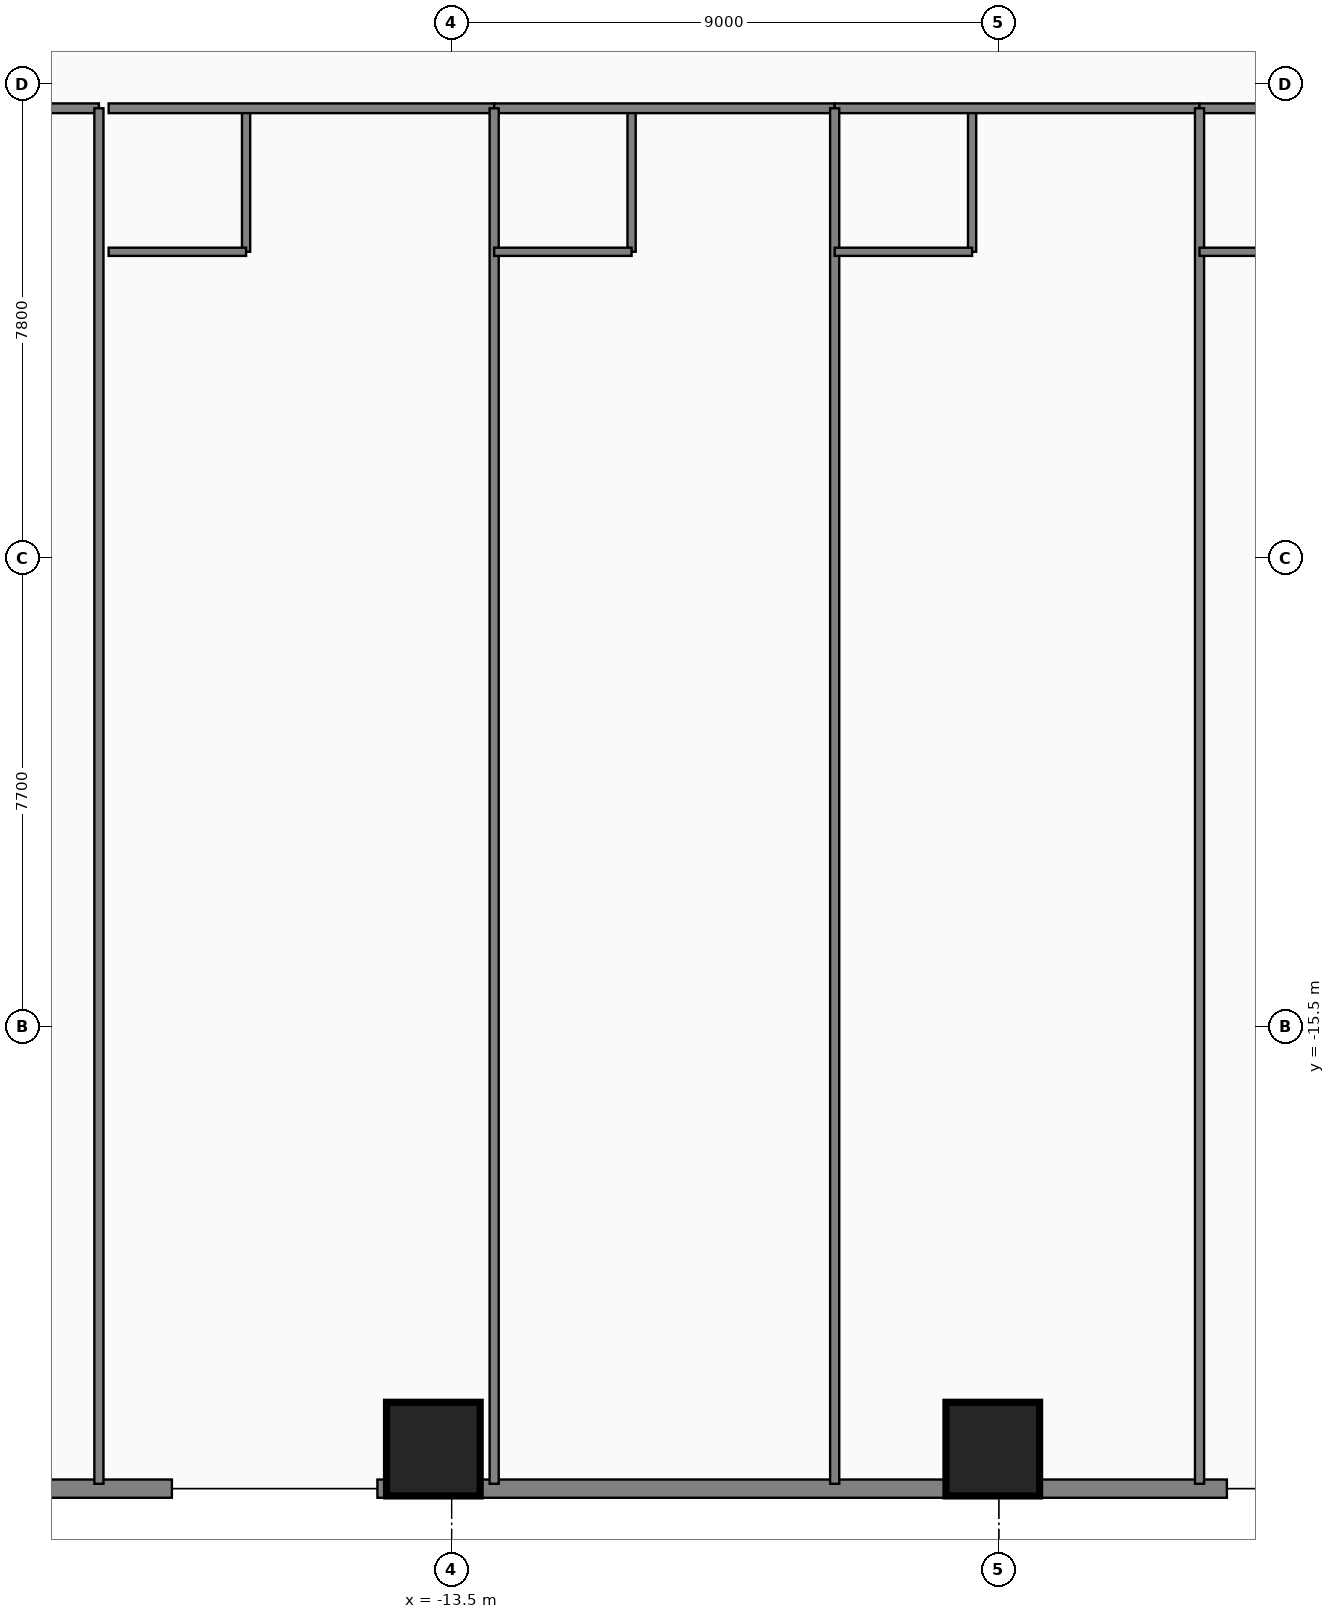
"""IFC4 building model, lengths in metres.
Left out: names, types, materials, properties, quantities, classifications, styles, units other than length and angle.
Written with IfcOpenShell. Run it as: python <this file> out.ifc"""

import sys

from ifc_helpers import new_model, si_unit, direction, frame, frame_2d, origin, origin_2d, place, context, subcontext, project, spatial, rectangle, extrude, element, fill, save


model = new_model("IFC4")
c1 = context("Model", 3, precision=1e-05, world=origin(), true_north=direction((0.0, 1.0)))
c2 = subcontext(c1, "Body", "Model", "MODEL_VIEW")
j1 = project(units=[si_unit("LENGTHUNIT", "METRE"), si_unit("PLANEANGLEUNIT", "RADIAN")], contexts=[c1])
p1 = place(None, origin())
s1 = spatial("IfcSite", under=j1, at=p1, CompositionType="ELEMENT")
p2 = place(p1, origin())
s2 = spatial("IfcBuilding", under=s1, at=p2, CompositionType="ELEMENT")
p3 = place(p2, frame((0.0, 0.0, 27.6)))
s3 = spatial("IfcBuildingStorey", under=s2, at=p3, CompositionType="ELEMENT", Elevation=27.6)
for number, where, z_axis, x_axis in (
    (1, (-13.8, -22.45, 0.0), (0.0, 0.0, 1.0), (1.0, 0.0, 0.0)),
    (2, (-4.6, -22.45, 0.0), (0.0, 0.0, 1.0), (1.0, 0.0, 0.0)),
):
    element("IfcColumn", number, at=place(p3, frame(where, z_axis=z_axis, x_axis=x_axis)), inside=s3, PredefinedType="COLUMN", context=c2, shape_type="SweptSolid", body=[
        extrude(rectangle(XDim=1.5, YDim=1.5, at=origin_2d()), origin(), (0.0, 0.0, 1.0), 3.65),
    ])
p4 = place(p3, frame((-0.75, -23.1, 0.0), z_axis=(0.0, 0.0, 1.0), x_axis=(-1.0, 0.0, 0.0)))
e3 = element("IfcWall", 3, at=p4, inside=s3, PredefinedType="STANDARD", context=c2, shape_type="SweptSolid", body=[
    extrude(rectangle(XDim=13.97, YDim=0.3, at=frame_2d((6.985, 0.0))), origin(), (0.0, 0.0, 1.0), 3.43),
])
p5 = place(p4, frame((8.053, 0.0, 0.0)))
e4 = element("IfcOpeningElement", 4, at=p5, cuts=e3, PredefinedType="OPENING", context=c2, shape_type="SweptSolid", body=[
    extrude(rectangle(XDim=1.05, YDim=2.2, at=frame_2d((0.525, 1.1))), frame((0.0, 0.16, 0.0), z_axis=(0.0, -1.0, 0.0), x_axis=(1.0, 0.0, 0.0)), (0.0, 0.0, 1.0), 0.32),
])
p6 = place(p4, frame((1.06, 0.0, 0.85)))
e5 = element("IfcOpeningElement", 5, at=p6, cuts=e3, PredefinedType="OPENING", context=c2, shape_type="SweptSolid", body=[
    extrude(rectangle(XDim=1.6, YDim=1.8, at=frame_2d((0.8, 0.9))), frame((0.0, 0.16, 0.0), z_axis=(0.0, -1.0, 0.0), x_axis=(1.0, 0.0, 0.0)), (0.0, 0.0, 1.0), 0.32),
])
p7 = place(p4, frame((4.865, 0.0, 0.95)))
e6 = element("IfcOpeningElement", 6, at=p7, cuts=e3, PredefinedType="OPENING", context=c2, shape_type="SweptSolid", body=[
    extrude(rectangle(XDim=1.15, YDim=1.55, at=frame_2d((0.575, 0.775))), frame((0.0, 0.16, 0.0), z_axis=(0.0, -1.0, 0.0), x_axis=(1.0, 0.0, 0.0)), (0.0, 0.0, 1.0), 0.32),
])
p8 = place(p4, frame((9.842, 0.0, 0.85)))
e7 = element("IfcOpeningElement", 7, at=p8, cuts=e3, PredefinedType="OPENING", context=c2, shape_type="SweptSolid", body=[
    extrude(rectangle(XDim=1.6, YDim=1.8, at=frame_2d((0.8, 0.9))), frame((0.0, 0.16, 0.0), z_axis=(0.0, -1.0, 0.0), x_axis=(1.0, 0.0, 0.0)), (0.0, 0.0, 1.0), 0.32),
])
p9 = place(p3, frame((-18.1, -23.1, 0.0), z_axis=(0.0, 0.0, 1.0), x_axis=(-1.0, 0.0, 0.0)))
e8 = element("IfcWall", 8, at=p9, inside=s3, PredefinedType="STANDARD", context=c2, shape_type="SweptSolid", body=[
    extrude(rectangle(XDim=4.0, YDim=0.3, at=frame_2d((2.0, 0.0))), origin(), (0.0, 0.0, 1.0), 3.43),
])
p10 = place(p9, frame((1.74, 0.0, 0.85)))
e9 = element("IfcOpeningElement", 9, at=p10, cuts=e8, PredefinedType="OPENING", context=c2, shape_type="SweptSolid", body=[
    extrude(rectangle(XDim=1.6, YDim=1.8, at=frame_2d((0.8, 0.9))), frame((0.0, 0.16, 0.0), z_axis=(0.0, -1.0, 0.0), x_axis=(1.0, 0.0, 0.0)), (0.0, 0.0, 1.0), 0.32),
])
p11 = place(p3, frame((-25.64, -0.4, 0.0), z_axis=(0.0, 0.0, 1.0), x_axis=(1.0, 0.0, 0.0)))
e10 = element("IfcWall", 10, at=p11, inside=s3, PredefinedType="PARTITIONING", context=c2, shape_type="SweptSolid", body=[
    extrude(rectangle(XDim=6.34, YDim=0.16, at=frame_2d((3.17, 0.0))), origin(), (0.0, 0.0, 1.0), 3.43),
])
p12 = place(p11, frame((3.82, 0.0, 0.0)))
e11 = element("IfcOpeningElement", 11, at=p12, cuts=e10, PredefinedType="OPENING", context=c2, shape_type="SweptSolid", body=[
    extrude(rectangle(XDim=1.0, YDim=2.15, at=frame_2d((0.5, 1.075))), frame((0.0, 0.09, 0.0), z_axis=(0.0, -1.0, 0.0), x_axis=(1.0, 0.0, 0.0)), (0.0, 0.0, 1.0), 0.18),
])
p13 = place(p3, frame((-16.88, -2.76, 0.0), z_axis=(0.0, 0.0, 1.0), x_axis=(0.0, 1.0, 0.0)))
e12 = element("IfcWall", 12, at=p13, inside=s3, PredefinedType="PLUMBINGWALL", context=c2, shape_type="SweptSolid", body=[
    extrude(rectangle(XDim=2.36, YDim=0.135, at=frame_2d((1.18, 0.0))), origin(), (0.0, 0.0, 1.0), 3.43),
])
p14 = place(p13, frame((0.65, 0.0, 0.0)))
e13 = element("IfcOpeningElement", 13, at=p14, cuts=e12, PredefinedType="OPENING", context=c2, shape_type="SweptSolid", body=[
    extrude(rectangle(XDim=0.85, YDim=2.1, at=frame_2d((0.425, 1.05))), frame((0.0, 0.077, 0.0), z_axis=(0.0, -1.0, 0.0), x_axis=(1.0, 0.0, 0.0)), (0.0, 0.0, 1.0), 0.155),
])
p15 = place(p3, frame((-19.14, -0.4, 0.0), z_axis=(0.0, 0.0, 1.0), x_axis=(1.0, 0.0, 0.0)))
e14 = element("IfcWall", 14, at=p15, inside=s3, PredefinedType="PARTITIONING", context=c2, shape_type="SweptSolid", body=[
    extrude(rectangle(XDim=6.34, YDim=0.16, at=frame_2d((3.17, 0.0))), origin(), (0.0, 0.0, 1.0), 3.43),
])
p16 = place(p15, frame((3.82, 0.0, 0.0)))
e15 = element("IfcOpeningElement", 15, at=p16, cuts=e14, PredefinedType="OPENING", context=c2, shape_type="SweptSolid", body=[
    extrude(rectangle(XDim=1.0, YDim=2.15, at=frame_2d((0.5, 1.075))), frame((0.0, 0.09, 0.0), z_axis=(0.0, -1.0, 0.0), x_axis=(1.0, 0.0, 0.0)), (0.0, 0.0, 1.0), 0.18),
])
p17 = place(p3, frame((-10.54, -2.76, 0.0), z_axis=(0.0, 0.0, 1.0), x_axis=(0.0, 1.0, 0.0)))
e16 = element("IfcWall", 16, at=p17, inside=s3, PredefinedType="PLUMBINGWALL", context=c2, shape_type="SweptSolid", body=[
    extrude(rectangle(XDim=2.36, YDim=0.135, at=frame_2d((1.18, 0.0))), origin(), (0.0, 0.0, 1.0), 3.43),
])
p18 = place(p17, frame((0.65, 0.0, 0.0)))
e17 = element("IfcOpeningElement", 17, at=p18, cuts=e16, PredefinedType="OPENING", context=c2, shape_type="SweptSolid", body=[
    extrude(rectangle(XDim=0.85, YDim=2.1, at=frame_2d((0.425, 1.05))), frame((0.0, 0.077, 0.0), z_axis=(0.0, -1.0, 0.0), x_axis=(1.0, 0.0, 0.0)), (0.0, 0.0, 1.0), 0.155),
])
p19 = place(p3, frame((-12.8, -0.4, 0.0), z_axis=(0.0, 0.0, 1.0), x_axis=(1.0, 0.0, 0.0)))
e18 = element("IfcWall", 18, at=p19, inside=s3, PredefinedType="PARTITIONING", context=c2, shape_type="SweptSolid", body=[
    extrude(rectangle(XDim=5.6, YDim=0.16, at=frame_2d((2.8, 0.0))), origin(), (0.0, 0.0, 1.0), 3.43),
])
p20 = place(p19, frame((3.45, 0.0, 0.0)))
e19 = element("IfcOpeningElement", 19, at=p20, cuts=e18, PredefinedType="OPENING", context=c2, shape_type="SweptSolid", body=[
    extrude(rectangle(XDim=1.0, YDim=2.15, at=frame_2d((0.5, 1.075))), frame((0.0, 0.09, 0.0), z_axis=(0.0, -1.0, 0.0), x_axis=(1.0, 0.0, 0.0)), (0.0, 0.0, 1.0), 0.18),
])
p21 = place(p3, frame((-4.94, -2.76, 0.0), z_axis=(0.0, 0.0, 1.0), x_axis=(0.0, 1.0, 0.0)))
e20 = element("IfcWall", 20, at=p21, inside=s3, PredefinedType="PLUMBINGWALL", context=c2, shape_type="SweptSolid", body=[
    extrude(rectangle(XDim=2.36, YDim=0.135, at=frame_2d((1.18, 0.0))), origin(), (0.0, 0.0, 1.0), 2.668),
])
p22 = place(p21, frame((0.65, 0.0, 0.0)))
e21 = element("IfcOpeningElement", 21, at=p22, cuts=e20, PredefinedType="OPENING", context=c2, shape_type="SweptSolid", body=[
    extrude(rectangle(XDim=0.85, YDim=2.1, at=frame_2d((0.425, 1.05))), frame((0.0, 0.077, 0.0), z_axis=(0.0, -1.0, 0.0), x_axis=(1.0, 0.0, 0.0)), (0.0, 0.0, 1.0), 0.155),
])
p23 = place(p3, frame((-7.2, -0.4, 0.0), z_axis=(0.0, 0.0, 1.0), x_axis=(1.0, 0.0, 0.0)))
e22 = element("IfcWall", 22, at=p23, inside=s3, PredefinedType="PARTITIONING", context=c2, shape_type="SweptSolid", body=[
    extrude(rectangle(XDim=6.0, YDim=0.16, at=frame_2d((3.0, 0.0))), origin(), (0.0, 0.0, 1.0), 3.43),
])
p24 = place(p23, frame((3.65, 0.0, 0.0)))
e23 = element("IfcOpeningElement", 23, at=p24, cuts=e22, PredefinedType="OPENING", context=c2, shape_type="SweptSolid", body=[
    extrude(rectangle(XDim=1.0, YDim=2.15, at=frame_2d((0.5, 1.075))), frame((0.0, 0.09, 0.0), z_axis=(0.0, -1.0, 0.0), x_axis=(1.0, 0.0, 0.0)), (0.0, 0.0, 1.0), 0.18),
])
p25 = place(p3, frame((-1.2, -0.4, 0.0), z_axis=(0.0, 0.0, 1.0), x_axis=(1.0, 0.0, 0.0)))
e24 = element("IfcWall", 24, at=p25, inside=s3, PredefinedType="PARTITIONING", context=c2, shape_type="SweptSolid", body=[
    extrude(rectangle(XDim=5.2, YDim=0.16, at=frame_2d((2.6, 0.0))), origin(), (0.0, 0.0, 1.0), 3.43),
])
p26 = place(p25, frame((3.25, 0.0, 0.0)))
e25 = element("IfcOpeningElement", 25, at=p26, cuts=e24, PredefinedType="OPENING", context=c2, shape_type="SweptSolid", body=[
    extrude(rectangle(XDim=1.0, YDim=2.15, at=frame_2d((0.5, 1.075))), frame((0.0, 0.09, 0.0), z_axis=(0.0, -1.0, 0.0), x_axis=(1.0, 0.0, 0.0)), (0.0, 0.0, 1.0), 0.18),
])
p27 = place(p3, frame((-19.3, -23.02, 0.0), z_axis=(0.0, 0.0, 1.0), x_axis=(0.0, 1.0, 0.0)))
e26 = element("IfcWall", 26, at=p27, inside=s3, PredefinedType="PARTITIONING", context=c2, shape_type="SweptSolid", body=[
    extrude(rectangle(XDim=22.62, YDim=0.15, at=frame_2d((11.31, 0.0))), origin(), (0.0, 0.0, 1.0), 3.43),
])
p28 = place(p3, frame((-19.14, -2.76, 0.0), z_axis=(0.0, 0.0, 1.0), x_axis=(1.0, 0.0, 0.0)))
e27 = element("IfcWall", 27, at=p28, inside=s3, PredefinedType="PLUMBINGWALL", context=c2, shape_type="SweptSolid", body=[
    extrude(rectangle(XDim=2.26, YDim=0.135, at=frame_2d((1.13, 0.0))), origin(), (0.0, 0.0, 1.0), 3.43),
])
p29 = place(p3, frame((-12.8, -23.02, 0.0), z_axis=(0.0, 0.0, 1.0), x_axis=(0.0, 1.0, 0.0)))
e28 = element("IfcWall", 28, at=p29, inside=s3, PredefinedType="PARTITIONING", context=c2, shape_type="SweptSolid", body=[
    extrude(rectangle(XDim=22.62, YDim=0.15, at=frame_2d((11.31, 0.0))), origin(), (0.0, 0.0, 1.0), 3.43),
])
p30 = place(p3, frame((-12.8, -2.76, 0.0), z_axis=(0.0, 0.0, 1.0), x_axis=(1.0, 0.0, 0.0)))
e29 = element("IfcWall", 29, at=p30, inside=s3, PredefinedType="PLUMBINGWALL", context=c2, shape_type="SweptSolid", body=[
    extrude(rectangle(XDim=2.26, YDim=0.135, at=frame_2d((1.13, 0.0))), origin(), (0.0, 0.0, 1.0), 3.43),
])
p31 = place(p3, frame((-7.2, -23.02, 0.0), z_axis=(0.0, 0.0, 1.0), x_axis=(0.0, 1.0, 0.0)))
e30 = element("IfcWall", 30, at=p31, inside=s3, PredefinedType="PARTITIONING", context=c2, shape_type="SweptSolid", body=[
    extrude(rectangle(XDim=22.62, YDim=0.15, at=frame_2d((11.31, 0.0))), origin(), (0.0, 0.0, 1.0), 3.43),
])
p32 = place(p3, frame((-7.2, -2.76, 0.0), z_axis=(0.0, 0.0, 1.0), x_axis=(1.0, 0.0, 0.0)))
e31 = element("IfcWall", 31, at=p32, inside=s3, PredefinedType="PLUMBINGWALL", context=c2, shape_type="SweptSolid", body=[
    extrude(rectangle(XDim=2.26, YDim=0.135, at=frame_2d((1.13, 0.0))), origin(), (0.0, 0.0, 1.0), 3.43),
])
p33 = place(p3, frame((-1.2, -23.02, 0.0), z_axis=(0.0, 0.0, 1.0), x_axis=(0.0, 1.0, 0.0)))
e32 = element("IfcWall", 32, at=p33, inside=s3, PredefinedType="PARTITIONING", context=c2, shape_type="SweptSolid", body=[
    extrude(rectangle(XDim=22.62, YDim=0.15, at=frame_2d((11.31, 0.0))), origin(), (0.0, 0.0, 1.0), 3.43),
])
p34 = place(p3, frame((-1.2, -2.76, 0.0), z_axis=(0.0, 0.0, 1.0), x_axis=(1.0, 0.0, 0.0)))
e33 = element("IfcWall", 33, at=p34, inside=s3, PredefinedType="PLUMBINGWALL", context=c2, shape_type="SweptSolid", body=[
    extrude(rectangle(XDim=2.26, YDim=0.135, at=frame_2d((1.13, 0.0))), origin(), (0.0, 0.0, 1.0), 3.43),
])
p35 = place(p5, origin())
e34 = element("IfcDoor", 34, at=p35, inside=s3, OperationType="SINGLE_SWING_RIGHT", PredefinedType="DOOR", context=c2, shape_type="SweptSolid", body=[
    extrude(rectangle(XDim=1.05, YDim=2.2, at=frame_2d((0.525, 1.1))), frame((0.0, 0.025, 0.0), z_axis=(0.0, -1.0, 0.0), x_axis=(1.0, 0.0, 0.0)), (0.0, 0.0, 1.0), 0.05),
])
fill(e4, e34)
p36 = place(p6, origin())
e35 = element("IfcWindow", 35, at=p36, inside=s3, PartitioningType="SINGLE_PANEL", PredefinedType="WINDOW", context=c2, shape_type="SweptSolid", body=[
    extrude(rectangle(XDim=1.6, YDim=1.8, at=frame_2d((0.8, 0.9))), frame((0.0, 0.03, 0.0), z_axis=(0.0, -1.0, 0.0), x_axis=(1.0, 0.0, 0.0)), (0.0, 0.0, 1.0), 0.06),
])
fill(e5, e35)
p37 = place(p7, origin())
e36 = element("IfcWindow", 36, at=p37, inside=s3, PartitioningType="SINGLE_PANEL", PredefinedType="WINDOW", context=c2, shape_type="SweptSolid", body=[
    extrude(rectangle(XDim=1.15, YDim=1.55, at=frame_2d((0.575, 0.775))), frame((0.0, 0.03, 0.0), z_axis=(0.0, -1.0, 0.0), x_axis=(1.0, 0.0, 0.0)), (0.0, 0.0, 1.0), 0.06),
])
fill(e6, e36)
p38 = place(p8, origin())
e37 = element("IfcWindow", 37, at=p38, inside=s3, PartitioningType="SINGLE_PANEL", PredefinedType="WINDOW", context=c2, shape_type="SweptSolid", body=[
    extrude(rectangle(XDim=1.6, YDim=1.8, at=frame_2d((0.8, 0.9))), frame((0.0, 0.03, 0.0), z_axis=(0.0, -1.0, 0.0), x_axis=(1.0, 0.0, 0.0)), (0.0, 0.0, 1.0), 0.06),
])
fill(e7, e37)
p39 = place(p10, origin())
e38 = element("IfcWindow", 38, at=p39, inside=s3, PartitioningType="SINGLE_PANEL", PredefinedType="WINDOW", context=c2, shape_type="SweptSolid", body=[
    extrude(rectangle(XDim=1.6, YDim=1.8, at=frame_2d((0.8, 0.9))), frame((0.0, 0.03, 0.0), z_axis=(0.0, -1.0, 0.0), x_axis=(1.0, 0.0, 0.0)), (0.0, 0.0, 1.0), 0.06),
])
fill(e9, e38)
p40 = place(p14, origin())
e39 = element("IfcDoor", 39, at=p40, inside=s3, OperationType="SINGLE_SWING_LEFT", PredefinedType="DOOR", context=c2, shape_type="SweptSolid", body=[
    extrude(rectangle(XDim=0.85, YDim=2.1, at=frame_2d((0.425, 1.05))), frame((0.0, 0.025, 0.0), z_axis=(0.0, -1.0, 0.0), x_axis=(1.0, 0.0, 0.0)), (0.0, 0.0, 1.0), 0.05),
])
fill(e13, e39)
p41 = place(p16, origin())
e40 = element("IfcDoor", 40, at=p41, inside=s3, OperationType="SINGLE_SWING_RIGHT", PredefinedType="DOOR", context=c2, shape_type="SweptSolid", body=[
    extrude(rectangle(XDim=1.0, YDim=2.15, at=frame_2d((0.5, 1.075))), frame((0.0, 0.025, 0.0), z_axis=(0.0, -1.0, 0.0), x_axis=(1.0, 0.0, 0.0)), (0.0, 0.0, 1.0), 0.05),
])
fill(e15, e40)
p42 = place(p18, origin())
e41 = element("IfcDoor", 41, at=p42, inside=s3, OperationType="SINGLE_SWING_LEFT", PredefinedType="DOOR", context=c2, shape_type="SweptSolid", body=[
    extrude(rectangle(XDim=0.85, YDim=2.1, at=frame_2d((0.425, 1.05))), frame((0.0, 0.025, 0.0), z_axis=(0.0, -1.0, 0.0), x_axis=(1.0, 0.0, 0.0)), (0.0, 0.0, 1.0), 0.05),
])
fill(e17, e41)
p43 = place(p20, origin())
e42 = element("IfcDoor", 42, at=p43, inside=s3, OperationType="SINGLE_SWING_RIGHT", PredefinedType="DOOR", context=c2, shape_type="SweptSolid", body=[
    extrude(rectangle(XDim=1.0, YDim=2.15, at=frame_2d((0.5, 1.075))), frame((0.0, 0.025, 0.0), z_axis=(0.0, -1.0, 0.0), x_axis=(1.0, 0.0, 0.0)), (0.0, 0.0, 1.0), 0.05),
])
fill(e19, e42)
p44 = place(p22, origin())
e43 = element("IfcDoor", 43, at=p44, inside=s3, OperationType="SINGLE_SWING_LEFT", PredefinedType="DOOR", context=c2, shape_type="SweptSolid", body=[
    extrude(rectangle(XDim=0.85, YDim=2.1, at=frame_2d((0.425, 1.05))), frame((0.0, 0.025, 0.0), z_axis=(0.0, -1.0, 0.0), x_axis=(1.0, 0.0, 0.0)), (0.0, 0.0, 1.0), 0.05),
])
fill(e21, e43)
p45 = place(p24, origin())
e44 = element("IfcDoor", 44, at=p45, inside=s3, OperationType="SINGLE_SWING_RIGHT", PredefinedType="DOOR", context=c2, shape_type="SweptSolid", body=[
    extrude(rectangle(XDim=1.0, YDim=2.15, at=frame_2d((0.5, 1.075))), frame((0.0, 0.025, 0.0), z_axis=(0.0, -1.0, 0.0), x_axis=(1.0, 0.0, 0.0)), (0.0, 0.0, 1.0), 0.05),
])
fill(e23, e44)
save(model, sys.argv[1])
